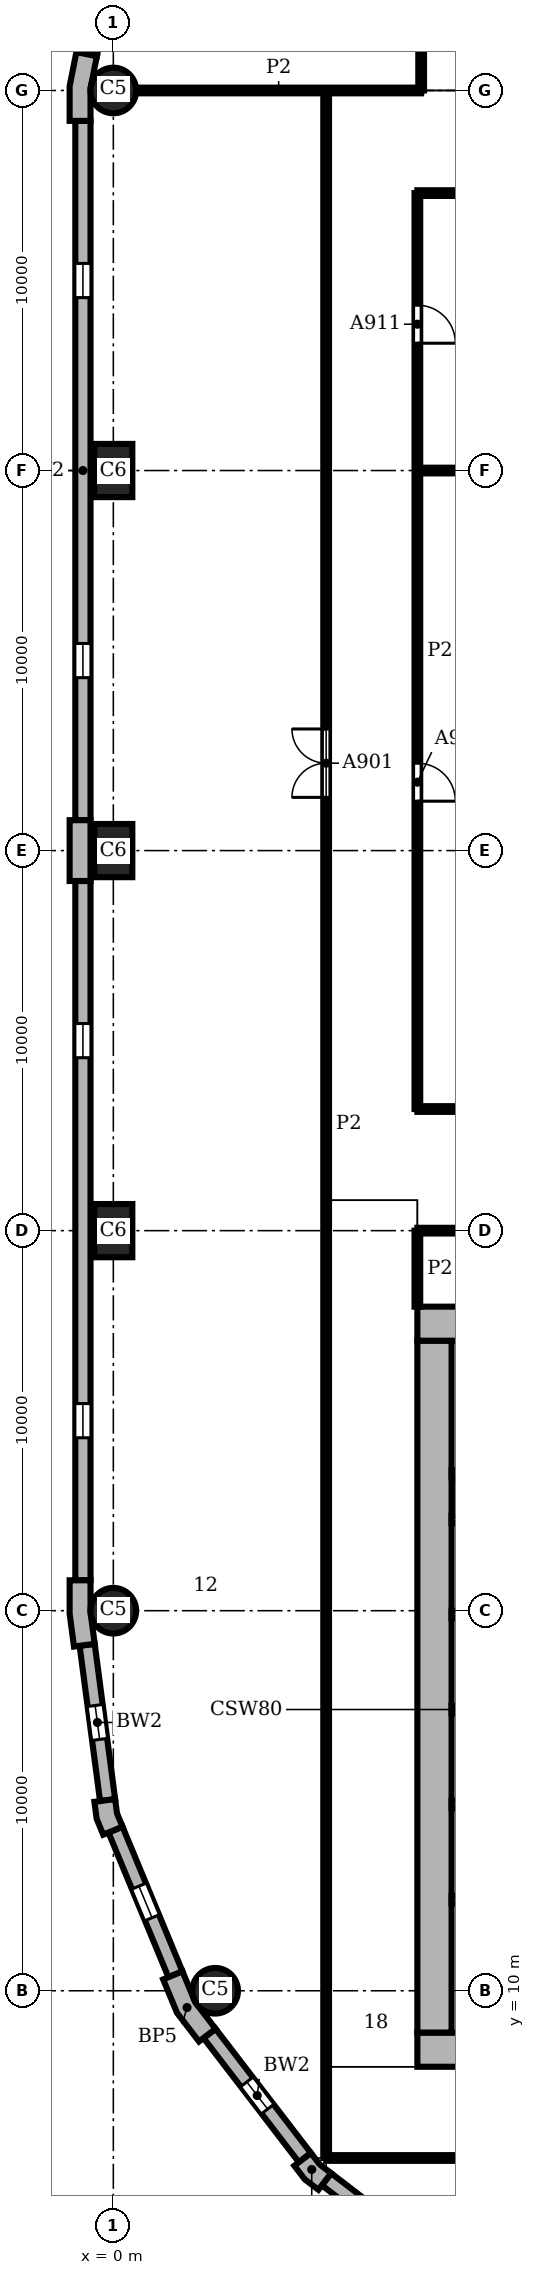
"""IFC4 building model, lengths in metres.
Left out: names, types, materials, properties, quantities, classifications, styles, units other than length and angle.
Written with IfcOpenShell. Run it as: python <this file> out.ifc"""

import sys

from ifc_helpers import new_model, si_unit, direction, frame, frame_2d, origin, origin_2d, place, context, subcontext, project, spatial, polyline, rectangle, circle, outline, extrude, element, fill, save


model = new_model("IFC4")
c1 = context("Model", 3, precision=1e-05, world=origin(), true_north=direction((0.0, 1.0)))
c2 = subcontext(c1, "Body", "Model", "MODEL_VIEW")
j1 = project(units=[si_unit("LENGTHUNIT", "METRE"), si_unit("PLANEANGLEUNIT", "RADIAN")], contexts=[c1])
p1 = place(None, origin())
s1 = spatial("IfcSite", under=j1, at=p1, CompositionType="ELEMENT")
p2 = place(p1, origin())
s2 = spatial("IfcBuilding", under=s1, at=p2, CompositionType="ELEMENT")
p3 = place(p2, frame((0.0, 0.0, 113.4)))
s3 = spatial("IfcBuildingStorey", under=s2, at=p3, CompositionType="ELEMENT", Elevation=113.4)
p4 = place(p3, frame((0.0, 60.0, 0.0), z_axis=(0.0, 0.0, 1.0), x_axis=(1.0, 0.0, 0.0)))
e1 = element("IfcColumn", 1, at=p4, inside=s3, PredefinedType="COLUMN", context=c2, shape_type="SweptSolid", body=[
    extrude(circle(Radius=0.6, at=origin_2d()), origin(), (0.0, 0.0, 1.0), 3.9),
])
for number, where, z_axis, x_axis in (
    (2, (0.0, 50.0, 0.0), (0.0, 0.0, 1.0), (0.0, 1.0, 0.0)),
    (3, (0.0, 40.0, 0.0), (0.0, 0.0, 1.0), (0.0, 1.0, 0.0)),
    (4, (0.0, 30.0, 0.0), (0.0, 0.0, 1.0), (0.0, 1.0, 0.0)),
):
    element("IfcColumn", number, at=place(p3, frame(where, z_axis=z_axis, x_axis=x_axis)), inside=s3, PredefinedType="COLUMN", context=c2, shape_type="SweptSolid", body=[
        extrude(rectangle(XDim=1.4, YDim=1.0, at=origin_2d()), origin(), (0.0, 0.0, 1.0), 3.9),
    ])
for number, where, z_axis, x_axis in (
    (5, (0.0, 20.0, 0.0), (0.0, 0.0, 1.0), (1.0, 0.0, 0.0)),
    (6, (2.679, 10.0, 0.0), (0.0, 0.0, 1.0), (1.0, 0.0, 0.0)),
):
    element("IfcColumn", number, at=place(p3, frame(where, z_axis=z_axis, x_axis=x_axis)), inside=s3, PredefinedType="COLUMN", context=c2, shape_type="SweptSolid", body=[
        extrude(circle(Radius=0.6, at=origin_2d()), origin(), (0.0, 0.0, 1.0), 3.9),
    ])
for number, where, z_axis, x_axis in (
    (7, (8.0, 8.45, 0.0), (0.0, 0.0, 1.0), (1.0, 0.0, 0.0)),
    (8, (28.0, 27.55, 0.0), (0.0, 0.0, 1.0), (-1.0, 0.0, 0.0)),
):
    element("IfcWall", number, at=place(p3, frame(where, z_axis=z_axis, x_axis=x_axis)), inside=s3, PredefinedType="SHEAR", context=c2, shape_type="SweptSolid", body=[
        extrude(rectangle(XDim=20.0, YDim=0.9, at=frame_2d((10.0, 0.0))), origin(), (0.0, 0.0, 1.0), 3.9),
    ])
p5 = place(p3, frame((8.45, 27.1, 0.0), z_axis=(0.0, 0.0, 1.0), x_axis=(0.0, -1.0, 0.0)))
e9 = element("IfcWall", 9, at=p5, inside=s3, PredefinedType="SHEAR", context=c2, shape_type="SweptSolid", body=[
    extrude(rectangle(XDim=18.2, YDim=0.9, at=frame_2d((9.1, 0.0))), origin(), (0.0, 0.0, 1.0), 3.9),
])
p6 = place(p3, origin())
e10 = element("IfcWall", 10, at=p6, inside=s3, PredefinedType="SOLIDWALL", context=c2, shape_type="SweptSolid", body=[
    extrude(outline(polyline([(-0.825, 60.98), (-0.972, 61.009), (-1.15, 60.113), (-1.15, 59.2), (-1.0, 59.2), (-0.6, 59.2), (-0.6, 60.059), (-0.432, 60.902), (-0.825, 60.98)])), origin(), (0.0, 0.0, 1.0), 3.9),
])
e11 = element("IfcWall", 11, at=p6, inside=s3, PredefinedType="SOLIDWALL", context=c2, shape_type="SweptSolid", body=[
    extrude(outline(polyline([(-1.0, 40.8), (-1.15, 40.8), (-1.15, 40.0), (-1.15, 39.2), (-1.0, 39.2), (-0.6, 39.2), (-0.6, 40.0), (-0.6, 40.8), (-1.0, 40.8)])), origin(), (0.0, 0.0, 1.0), 3.9),
])
e12 = element("IfcWall", 12, at=p6, inside=s3, PredefinedType="SOLIDWALL", context=c2, shape_type="SweptSolid", body=[
    extrude(outline(polyline([(-1.0, 20.8), (-1.15, 20.8), (-1.15, 19.925), (-1.036, 19.057), (-0.887, 19.076), (-0.49, 19.128), (-0.6, 19.961), (-0.6, 20.8), (-1.0, 20.8)])), origin(), (0.0, 0.0, 1.0), 3.9),
])
e13 = element("IfcWall", 13, at=p6, inside=s3, PredefinedType="SOLIDWALL", context=c2, shape_type="SweptSolid", body=[
    extrude(outline(polyline([(-0.349, 14.99), (-0.498, 14.971), (-0.439, 14.523), (-0.266, 14.106), (-0.128, 14.164), (0.242, 14.317), (0.097, 14.667), (0.047, 15.043), (-0.349, 14.99)])), origin(), (0.0, 0.0, 1.0), 3.9),
])
e14 = element("IfcWall", 14, at=p6, inside=s3, PredefinedType="SOLIDWALL", context=c2, shape_type="SweptSolid", body=[
    extrude(outline(polyline([(1.449, 10.356), (1.311, 10.299), (1.675, 9.42), (2.254, 8.665), (2.373, 8.757), (2.69, 9.0), (2.155, 9.698), (1.819, 10.51), (1.449, 10.356)])), origin(), (0.0, 0.0, 1.0), 3.9),
])
e15 = element("IfcWall", 15, at=p6, inside=s3, PredefinedType="SOLIDWALL", context=c2, shape_type="SweptSolid", body=[
    extrude(outline(polyline([(4.882, 5.487), (4.763, 5.396), (5.038, 5.038), (5.396, 4.763), (5.487, 4.882), (5.731, 5.199), (5.43, 5.43), (5.199, 5.731), (4.882, 5.487)])), origin(), (0.0, 0.0, 1.0), 3.9),
])
p7 = place(p3, frame((0.299, 65.602, 0.0), z_axis=(0.0, 0.0, 1.0), x_axis=(-0.195098533057, -0.98078364709, 0.0)))
e16 = element("IfcWall", 16, at=p7, inside=s3, PredefinedType="SOLIDWALL", context=c2, shape_type="SweptSolid", body=[
    extrude(rectangle(XDim=4.753, YDim=0.4, at=frame_2d((2.376, 0.0))), origin(), (0.0, 0.0, 1.0), 3.9),
])
p8 = place(p7, frame((0.226, 0.0, 0.9)))
e17 = element("IfcOpeningElement", 17, at=p8, cuts=e16, PredefinedType="OPENING", context=c2, shape_type="SweptSolid", body=[
    extrude(rectangle(XDim=4.3, YDim=2.35, at=frame_2d((2.15, 1.175))), frame((0.0, 0.21, 0.0), z_axis=(0.0, -1.0, 0.0), x_axis=(1.0, 0.0, 0.0)), (0.0, 0.0, 1.0), 0.42),
])
p9 = place(p3, frame((-0.8, 59.2, 0.0), z_axis=(0.0, 0.0, 1.0), x_axis=(0.0, -1.0, 0.0)))
e18 = element("IfcWall", 18, at=p9, inside=s3, PredefinedType="SOLIDWALL", context=c2, shape_type="SweptSolid", body=[
    extrude(rectangle(XDim=18.4, YDim=0.4, at=frame_2d((9.2, 0.0))), origin(), (0.0, 0.0, 1.0), 3.9),
])
p10 = place(p9, frame((3.75, 0.0, 0.9)))
e19 = element("IfcOpeningElement", 19, at=p10, cuts=e18, PredefinedType="OPENING", context=c2, shape_type="SweptSolid", body=[
    extrude(rectangle(XDim=0.9, YDim=2.35, at=frame_2d((0.45, 1.175))), frame((0.0, 0.21, 0.0), z_axis=(0.0, -1.0, 0.0), x_axis=(1.0, 0.0, 0.0)), (0.0, 0.0, 1.0), 0.42),
])
p11 = place(p9, frame((13.75, 0.0, 0.9)))
e20 = element("IfcOpeningElement", 20, at=p11, cuts=e18, PredefinedType="OPENING", context=c2, shape_type="SweptSolid", body=[
    extrude(rectangle(XDim=0.9, YDim=2.35, at=frame_2d((0.45, 1.175))), frame((0.0, 0.21, 0.0), z_axis=(0.0, -1.0, 0.0), x_axis=(1.0, 0.0, 0.0)), (0.0, 0.0, 1.0), 0.42),
])
p12 = place(p3, frame((-0.8, 39.2, 0.0), z_axis=(0.0, 0.0, 1.0), x_axis=(0.0, -1.0, 0.0)))
e21 = element("IfcWall", 21, at=p12, inside=s3, PredefinedType="SOLIDWALL", context=c2, shape_type="SweptSolid", body=[
    extrude(rectangle(XDim=18.4, YDim=0.4, at=frame_2d((9.2, 0.0))), origin(), (0.0, 0.0, 1.0), 3.9),
])
p13 = place(p12, frame((3.75, 0.0, 0.9)))
e22 = element("IfcOpeningElement", 22, at=p13, cuts=e21, PredefinedType="OPENING", context=c2, shape_type="SweptSolid", body=[
    extrude(rectangle(XDim=0.9, YDim=2.35, at=frame_2d((0.45, 1.175))), frame((0.0, 0.21, 0.0), z_axis=(0.0, -1.0, 0.0), x_axis=(1.0, 0.0, 0.0)), (0.0, 0.0, 1.0), 0.42),
])
p14 = place(p12, frame((13.75, 0.0, 0.9)))
e23 = element("IfcOpeningElement", 23, at=p14, cuts=e21, PredefinedType="OPENING", context=c2, shape_type="SweptSolid", body=[
    extrude(rectangle(XDim=0.9, YDim=2.35, at=frame_2d((0.45, 1.175))), frame((0.0, 0.21, 0.0), z_axis=(0.0, -1.0, 0.0), x_axis=(1.0, 0.0, 0.0)), (0.0, 0.0, 1.0), 0.42),
])
p15 = place(p3, frame((-0.689, 19.102, 0.0), z_axis=(0.0, 0.0, 1.0), x_axis=(0.130514280502, -0.991446429508, 0.0)))
e24 = element("IfcWall", 24, at=p15, inside=s3, PredefinedType="SOLIDWALL", context=c2, shape_type="SweptSolid", body=[
    extrude(rectangle(XDim=4.121, YDim=0.4, at=frame_2d((2.061, 0.0))), origin(), (0.0, 0.0, 1.0), 3.9),
])
p16 = place(p15, frame((1.611, 0.0, 0.9)))
e25 = element("IfcOpeningElement", 25, at=p16, cuts=e24, PredefinedType="OPENING", context=c2, shape_type="SweptSolid", body=[
    extrude(rectangle(XDim=0.9, YDim=2.35, at=frame_2d((0.45, 1.175))), frame((0.0, 0.21, 0.0), z_axis=(0.0, -1.0, 0.0), x_axis=(1.0, 0.0, 0.0)), (0.0, 0.0, 1.0), 0.42),
])
p17 = place(p3, frame((0.057, 14.24, 0.0), z_axis=(0.0, 0.0, 1.0), x_axis=(0.382721546029, -0.923863744394, 0.0)))
e26 = element("IfcWall", 26, at=p17, inside=s3, PredefinedType="SOLIDWALL", context=c2, shape_type="SweptSolid", body=[
    extrude(rectangle(XDim=4.121, YDim=0.4, at=frame_2d((2.061, 0.0))), origin(), (0.0, 0.0, 1.0), 3.9),
])
p18 = place(p17, frame((1.611, 0.0, 0.9)))
e27 = element("IfcOpeningElement", 27, at=p18, cuts=e26, PredefinedType="OPENING", context=c2, shape_type="SweptSolid", body=[
    extrude(rectangle(XDim=0.9, YDim=2.35, at=frame_2d((0.45, 1.175))), frame((0.0, 0.21, 0.0), z_axis=(0.0, -1.0, 0.0), x_axis=(1.0, 0.0, 0.0)), (0.0, 0.0, 1.0), 0.42),
])
p19 = place(p3, frame((2.532, 8.878, 0.0), z_axis=(0.0, 0.0, 1.0), x_axis=(0.608759824817, -0.793354571229, 0.0)))
e28 = element("IfcWall", 28, at=p19, inside=s3, PredefinedType="SOLIDWALL", context=c2, shape_type="SweptSolid", body=[
    extrude(rectangle(XDim=4.121, YDim=0.4, at=frame_2d((2.061, 0.0))), origin(), (0.0, 0.0, 1.0), 3.9),
])
p20 = place(p19, frame((1.611, 0.0, 0.9)))
e29 = element("IfcOpeningElement", 29, at=p20, cuts=e28, PredefinedType="OPENING", context=c2, shape_type="SweptSolid", body=[
    extrude(rectangle(XDim=0.9, YDim=2.35, at=frame_2d((0.45, 1.175))), frame((0.0, 0.21, 0.0), z_axis=(0.0, -1.0, 0.0), x_axis=(1.0, 0.0, 0.0)), (0.0, 0.0, 1.0), 0.42),
])
p21 = place(p3, frame((5.609, 5.041, 0.0), z_axis=(0.0, 0.0, 1.0), x_axis=(0.793354571229, -0.608759824817, 0.0)))
e30 = element("IfcWall", 30, at=p21, inside=s3, PredefinedType="SOLIDWALL", context=c2, shape_type="SweptSolid", body=[
    extrude(rectangle(XDim=4.121, YDim=0.4, at=frame_2d((2.061, 0.0))), origin(), (0.0, 0.0, 1.0), 3.9),
])
p22 = place(p21, frame((1.611, 0.0, 0.9)))
e31 = element("IfcOpeningElement", 31, at=p22, cuts=e30, PredefinedType="OPENING", context=c2, shape_type="SweptSolid", body=[
    extrude(rectangle(XDim=0.9, YDim=2.35, at=frame_2d((0.45, 1.175))), frame((0.0, 0.21, 0.0), z_axis=(0.0, -1.0, 0.0), x_axis=(1.0, 0.0, 0.0)), (0.0, 0.0, 1.0), 0.42),
])
p23 = place(p3, frame((8.9, 12.4, 0.0), z_axis=(0.0, 0.0, 1.0), x_axis=(1.0, 0.0, 0.0)))
e32 = element("IfcWall", 32, at=p23, inside=s3, PredefinedType="SHEAR", context=c2, shape_type="SweptSolid", body=[
    extrude(rectangle(XDim=4.9, YDim=0.2, at=frame_2d((2.45, 0.0))), origin(), (0.0, 0.0, 1.0), 3.45),
])
for number, where, z_axis, x_axis in (
    (33, (8.9, 14.9, 0.0), (0.0, 0.0, 1.0), (1.0, 0.0, 0.0)),
    (34, (8.9, 17.4, 0.0), (0.0, 0.0, 1.0), (1.0, 0.0, 0.0)),
    (35, (8.9, 19.9, 0.0), (0.0, 0.0, 1.0), (1.0, 0.0, 0.0)),
    (36, (8.9, 22.4, 0.0), (0.0, 0.0, 1.0), (1.0, 0.0, 0.0)),
):
    element("IfcWall", number, at=place(p3, frame(where, z_axis=z_axis, x_axis=x_axis)), inside=s3, PredefinedType="SHEAR", context=c2, shape_type="SweptSolid", body=[
        extrude(rectangle(XDim=2.8, YDim=0.2, at=frame_2d((1.4, 0.0))), origin(), (0.0, 0.0, 1.0), 3.45),
    ])
p24 = place(p3, frame((8.9, 23.6, 0.0), z_axis=(0.0, 0.0, 1.0), x_axis=(1.0, 0.0, 0.0)))
e37 = element("IfcWall", 37, at=p24, inside=s3, PredefinedType="SHEAR", context=c2, shape_type="SweptSolid", body=[
    extrude(rectangle(XDim=4.9, YDim=0.2, at=frame_2d((2.45, 0.0))), origin(), (0.0, 0.0, 1.0), 3.45),
])
p25 = place(p3, frame((5.6, 5.6, 0.0), z_axis=(0.0, 0.0, 1.0), x_axis=(0.0, 1.0, 0.0)))
e38 = element("IfcWall", 38, at=p25, inside=s3, PredefinedType="PARTITIONING", context=c2, shape_type="SweptSolid", body=[
    extrude(rectangle(XDim=54.4, YDim=0.15, at=frame_2d((27.2, 0.0))), origin(), (0.0, 0.0, 1.0), 3.45),
])
p26 = place(p25, frame((35.8, 0.0, 0.0)))
e39 = element("IfcOpeningElement", 39, at=p26, cuts=e38, PredefinedType="OPENING", context=c2, shape_type="SweptSolid", body=[
    extrude(rectangle(XDim=1.8, YDim=2.1, at=frame_2d((0.9, 1.05))), frame((0.0, 0.085, 0.0), z_axis=(0.0, -1.0, 0.0), x_axis=(1.0, 0.0, 0.0)), (0.0, 0.0, 1.0), 0.17),
])
p27 = place(p3, frame((8.0, 28.0, 0.0), z_axis=(0.0, 0.0, 1.0), x_axis=(0.0, 1.0, 0.0)))
e40 = element("IfcWall", 40, at=p27, inside=s3, PredefinedType="PARTITIONING", context=c2, shape_type="SweptSolid", body=[
    extrude(rectangle(XDim=2.0, YDim=0.15, at=frame_2d((1.0, 0.0))), origin(), (0.0, 0.0, 1.0), 3.45),
])
p28 = place(p3, frame((8.0, 33.2, 0.0), z_axis=(0.0, 0.0, 1.0), x_axis=(0.0, 1.0, 0.0)))
e41 = element("IfcWall", 41, at=p28, inside=s3, PredefinedType="PARTITIONING", context=c2, shape_type="SweptSolid", body=[
    extrude(rectangle(XDim=24.1, YDim=0.15, at=frame_2d((12.05, 0.0))), origin(), (0.0, 0.0, 1.0), 3.45),
])
p29 = place(p28, frame((8.1, 0.0, 0.0)))
e42 = element("IfcOpeningElement", 42, at=p29, cuts=e41, PredefinedType="OPENING", context=c2, shape_type="SweptSolid", body=[
    extrude(rectangle(XDim=1.0, YDim=2.1, at=frame_2d((0.5, 1.05))), frame((0.0, 0.085, 0.0), z_axis=(0.0, -1.0, 0.0), x_axis=(1.0, 0.0, 0.0)), (0.0, 0.0, 1.0), 0.17),
])
p30 = place(p28, frame((20.15, 0.0, 0.0)))
e43 = element("IfcOpeningElement", 43, at=p30, cuts=e41, PredefinedType="OPENING", context=c2, shape_type="SweptSolid", body=[
    extrude(rectangle(XDim=1.0, YDim=2.1, at=frame_2d((0.5, 1.05))), frame((0.0, 0.085, 0.0), z_axis=(0.0, -1.0, 0.0), x_axis=(1.0, 0.0, 0.0)), (0.0, 0.0, 1.0), 0.17),
])
p31 = place(p3, frame((8.1, 60.0, 0.0), z_axis=(0.0, 0.0, 1.0), x_axis=(0.0, 1.0, 0.0)))
e44 = element("IfcWall", 44, at=p31, inside=s3, PredefinedType="PARTITIONING", context=c2, shape_type="SweptSolid", body=[
    extrude(rectangle(XDim=6.4, YDim=0.15, at=frame_2d((3.2, 0.0))), origin(), (0.0, 0.0, 1.0), 3.45),
])
p32 = place(p31, frame((3.1, 0.0, 0.0)))
e45 = element("IfcOpeningElement", 45, at=p32, cuts=e44, PredefinedType="OPENING", context=c2, shape_type="SweptSolid", body=[
    extrude(rectangle(XDim=1.0, YDim=2.1, at=frame_2d((0.5, 1.05))), frame((0.0, 0.085, 0.0), z_axis=(0.0, -1.0, 0.0), x_axis=(1.0, 0.0, 0.0)), (0.0, 0.0, 1.0), 0.17),
])
p33 = place(p3, frame((5.6, 5.6, 0.0), z_axis=(0.0, 0.0, 1.0), x_axis=(1.0, 0.0, 0.0)))
e46 = element("IfcWall", 46, at=p33, inside=s3, PredefinedType="PARTITIONING", context=c2, shape_type="SweptSolid", body=[
    extrude(rectangle(XDim=25.4, YDim=0.15, at=frame_2d((12.7, 0.0))), origin(), (0.0, 0.0, 1.0), 3.45),
])
p34 = place(p33, frame((3.6, 0.0, 0.0)))
e47 = element("IfcOpeningElement", 47, at=p34, cuts=e46, PredefinedType="OPENING", context=c2, shape_type="SweptSolid", body=[
    extrude(rectangle(XDim=1.0, YDim=2.1, at=frame_2d((0.5, 1.05))), frame((0.0, 0.085, 0.0), z_axis=(0.0, -1.0, 0.0), x_axis=(1.0, 0.0, 0.0)), (0.0, 0.0, 1.0), 0.17),
])
p35 = place(p33, frame((11.75, 0.0, 0.0)))
e48 = element("IfcOpeningElement", 48, at=p35, cuts=e46, PredefinedType="OPENING", context=c2, shape_type="SweptSolid", body=[
    extrude(rectangle(XDim=1.0, YDim=2.1, at=frame_2d((0.5, 1.05))), frame((0.0, 0.085, 0.0), z_axis=(0.0, -1.0, 0.0), x_axis=(1.0, 0.0, 0.0)), (0.0, 0.0, 1.0), 0.17),
])
p36 = place(p33, frame((20.0, 0.0, 0.0)))
e49 = element("IfcOpeningElement", 49, at=p36, cuts=e46, PredefinedType="OPENING", context=c2, shape_type="SweptSolid", body=[
    extrude(rectangle(XDim=1.0, YDim=2.1, at=frame_2d((0.5, 1.05))), frame((0.0, 0.085, 0.0), z_axis=(0.0, -1.0, 0.0), x_axis=(1.0, 0.0, 0.0)), (0.0, 0.0, 1.0), 0.17),
])
p37 = place(p3, frame((8.0, 30.0, 0.0), z_axis=(0.0, 0.0, 1.0), x_axis=(1.0, 0.0, 0.0)))
e50 = element("IfcWall", 50, at=p37, inside=s3, PredefinedType="PARTITIONING", context=c2, shape_type="SweptSolid", body=[
    extrude(rectangle(XDim=1.2, YDim=0.15, at=frame_2d((0.6, 0.0))), origin(), (0.0, 0.0, 1.0), 3.45),
])
p38 = place(p3, frame((8.0, 33.2, 0.0), z_axis=(0.0, 0.0, 1.0), x_axis=(1.0, 0.0, 0.0)))
e51 = element("IfcWall", 51, at=p38, inside=s3, PredefinedType="PARTITIONING", context=c2, shape_type="SweptSolid", body=[
    extrude(rectangle(XDim=5.8, YDim=0.15, at=frame_2d((2.9, 0.0))), origin(), (0.0, 0.0, 1.0), 3.45),
])
p39 = place(p3, frame((8.0, 50.0, 0.0), z_axis=(0.0, 0.0, 1.0), x_axis=(1.0, 0.0, 0.0)))
e52 = element("IfcWall", 52, at=p39, inside=s3, PredefinedType="PARTITIONING", context=c2, shape_type="SweptSolid", body=[
    extrude(rectangle(XDim=1.2, YDim=0.15, at=frame_2d((0.6, 0.0))), origin(), (0.0, 0.0, 1.0), 3.45),
])
p40 = place(p3, frame((8.0, 57.3, 0.0), z_axis=(0.0, 0.0, 1.0), x_axis=(1.0, 0.0, 0.0)))
e53 = element("IfcWall", 53, at=p40, inside=s3, PredefinedType="PARTITIONING", context=c2, shape_type="SweptSolid", body=[
    extrude(rectangle(XDim=5.8, YDim=0.15, at=frame_2d((2.9, 0.0))), origin(), (0.0, 0.0, 1.0), 3.45),
])
p41 = place(p3, frame((0.6, 60.0, 0.0), z_axis=(0.0, 0.0, 1.0), x_axis=(1.0, 0.0, 0.0)))
e54 = element("IfcWall", 54, at=p41, inside=s3, PredefinedType="PARTITIONING", context=c2, shape_type="SweptSolid", body=[
    extrude(rectangle(XDim=7.5, YDim=0.15, at=frame_2d((3.75, 0.0))), origin(), (0.0, 0.0, 1.0), 3.45),
])
p42 = place(p10, origin())
e55 = element("IfcWindow", 55, at=p42, inside=s3, PartitioningType="SINGLE_PANEL", PredefinedType="WINDOW", context=c2, shape_type="SweptSolid", body=[
    extrude(rectangle(XDim=0.9, YDim=2.35, at=frame_2d((0.45, 1.175))), frame((0.0, 0.16, 0.0), z_axis=(0.0, -1.0, 0.0), x_axis=(1.0, 0.0, 0.0)), (0.0, 0.0, 1.0), 0.06),
])
fill(e19, e55)
p43 = place(p11, origin())
e56 = element("IfcWindow", 56, at=p43, inside=s3, PartitioningType="SINGLE_PANEL", PredefinedType="WINDOW", context=c2, shape_type="SweptSolid", body=[
    extrude(rectangle(XDim=0.9, YDim=2.35, at=frame_2d((0.45, 1.175))), frame((0.0, 0.16, 0.0), z_axis=(0.0, -1.0, 0.0), x_axis=(1.0, 0.0, 0.0)), (0.0, 0.0, 1.0), 0.06),
])
fill(e20, e56)
p44 = place(p13, origin())
e57 = element("IfcWindow", 57, at=p44, inside=s3, PartitioningType="SINGLE_PANEL", PredefinedType="WINDOW", context=c2, shape_type="SweptSolid", body=[
    extrude(rectangle(XDim=0.9, YDim=2.35, at=frame_2d((0.45, 1.175))), frame((0.0, 0.16, 0.0), z_axis=(0.0, -1.0, 0.0), x_axis=(1.0, 0.0, 0.0)), (0.0, 0.0, 1.0), 0.06),
])
fill(e22, e57)
p45 = place(p14, origin())
e58 = element("IfcWindow", 58, at=p45, inside=s3, PartitioningType="SINGLE_PANEL", PredefinedType="WINDOW", context=c2, shape_type="SweptSolid", body=[
    extrude(rectangle(XDim=0.9, YDim=2.35, at=frame_2d((0.45, 1.175))), frame((0.0, 0.16, 0.0), z_axis=(0.0, -1.0, 0.0), x_axis=(1.0, 0.0, 0.0)), (0.0, 0.0, 1.0), 0.06),
])
fill(e23, e58)
p46 = place(p16, origin())
e59 = element("IfcWindow", 59, at=p46, inside=s3, PartitioningType="SINGLE_PANEL", PredefinedType="WINDOW", context=c2, shape_type="SweptSolid", body=[
    extrude(rectangle(XDim=0.9, YDim=2.35, at=frame_2d((0.45, 1.175))), frame((0.0, 0.16, 0.0), z_axis=(0.0, -1.0, 0.0), x_axis=(1.0, 0.0, 0.0)), (0.0, 0.0, 1.0), 0.06),
])
fill(e25, e59)
p47 = place(p18, origin())
e60 = element("IfcWindow", 60, at=p47, inside=s3, PartitioningType="SINGLE_PANEL", PredefinedType="WINDOW", context=c2, shape_type="SweptSolid", body=[
    extrude(rectangle(XDim=0.9, YDim=2.35, at=frame_2d((0.45, 1.175))), frame((0.0, 0.16, 0.0), z_axis=(0.0, -1.0, 0.0), x_axis=(1.0, 0.0, 0.0)), (0.0, 0.0, 1.0), 0.06),
])
fill(e27, e60)
p48 = place(p20, origin())
e61 = element("IfcWindow", 61, at=p48, inside=s3, PartitioningType="SINGLE_PANEL", PredefinedType="WINDOW", context=c2, shape_type="SweptSolid", body=[
    extrude(rectangle(XDim=0.9, YDim=2.35, at=frame_2d((0.45, 1.175))), frame((0.0, 0.16, 0.0), z_axis=(0.0, -1.0, 0.0), x_axis=(1.0, 0.0, 0.0)), (0.0, 0.0, 1.0), 0.06),
])
fill(e29, e61)
p49 = place(p26, origin())
e62 = element("IfcDoor", 62, at=p49, inside=s3, OperationType="DOUBLE_DOOR_SINGLE_SWING", PredefinedType="DOOR", context=c2, shape_type="SweptSolid", body=[
    extrude(rectangle(XDim=1.8, YDim=2.1, at=frame_2d((0.9, 1.05))), frame((0.0, 0.025, 0.0), z_axis=(0.0, -1.0, 0.0), x_axis=(1.0, 0.0, 0.0)), (0.0, 0.0, 1.0), 0.05),
])
fill(e39, e62)
p50 = place(p29, frame((1.0, 0.0, 0.0), z_axis=(0.0, 0.0, 1.0), x_axis=(-1.0, 0.0, 0.0)))
e63 = element("IfcDoor", 63, at=p50, inside=s3, OperationType="SINGLE_SWING_RIGHT", PredefinedType="DOOR", context=c2, shape_type="SweptSolid", body=[
    extrude(rectangle(XDim=1.0, YDim=2.1, at=frame_2d((0.5, 1.05))), frame((0.0, 0.025, 0.0), z_axis=(0.0, -1.0, 0.0), x_axis=(1.0, 0.0, 0.0)), (0.0, 0.0, 1.0), 0.05),
])
fill(e42, e63)
p51 = place(p30, frame((1.0, 0.0, 0.0), z_axis=(0.0, 0.0, 1.0), x_axis=(-1.0, 0.0, 0.0)))
e64 = element("IfcDoor", 64, at=p51, inside=s3, OperationType="SINGLE_SWING_RIGHT", PredefinedType="DOOR", context=c2, shape_type="SweptSolid", body=[
    extrude(rectangle(XDim=1.0, YDim=2.1, at=frame_2d((0.5, 1.05))), frame((0.0, 0.025, 0.0), z_axis=(0.0, -1.0, 0.0), x_axis=(1.0, 0.0, 0.0)), (0.0, 0.0, 1.0), 0.05),
])
fill(e43, e64)
save(model, sys.argv[1])
